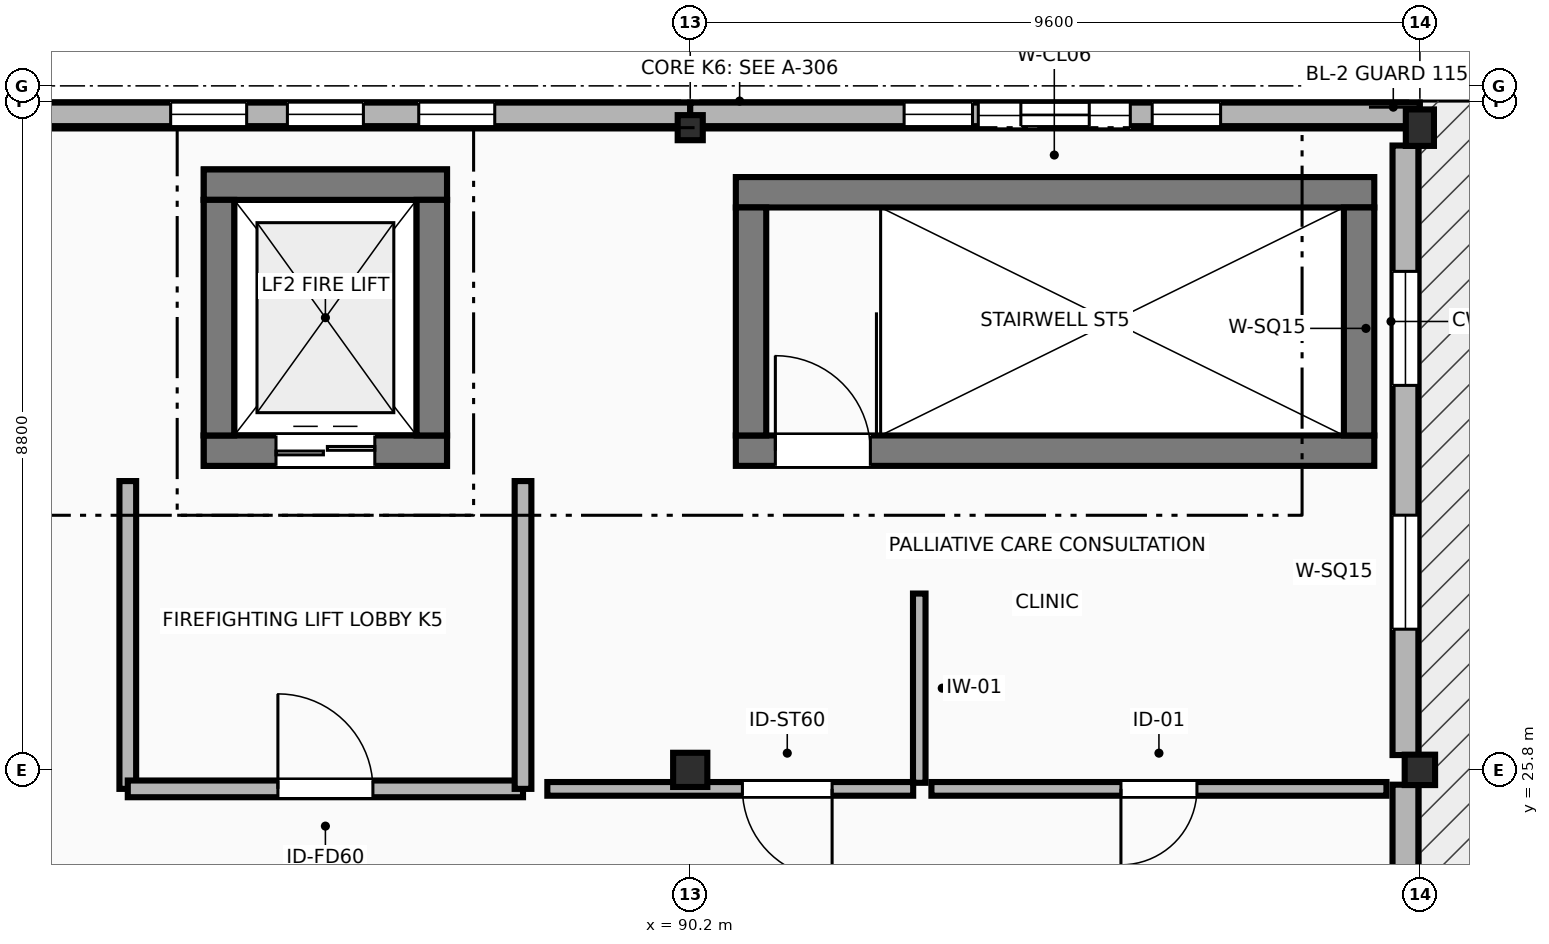
"""IFC4 building model, lengths in metres.
Left out: names, types, materials, properties, quantities, classifications, styles, units other than length and angle.
Written with IfcOpenShell. Run it as: python <this file> out.ifc"""

import sys

from ifc_helpers import new_model, si_unit, direction, frame, frame_2d, origin, origin_2d, place, context, subcontext, project, spatial, polyline, rectangle, outline, extrude, element, fill, save


model = new_model("IFC4")
c1 = context("Model", 3, precision=1e-05, world=origin(), true_north=direction((0.0, 1.0)))
c2 = subcontext(c1, "Body", "Model", "MODEL_VIEW")
j1 = project(units=[si_unit("LENGTHUNIT", "METRE"), si_unit("PLANEANGLEUNIT", "RADIAN")], contexts=[c1])
p1 = place(None, origin())
s1 = spatial("IfcSite", under=j1, at=p1, CompositionType="ELEMENT")
p2 = place(p1, origin())
s2 = spatial("IfcBuilding", under=s1, at=p2, CompositionType="ELEMENT")
p3 = place(p2, frame((0.0, 0.0, 22.2)))
s3 = spatial("IfcBuildingStorey", under=s2, at=p3, CompositionType="ELEMENT", Elevation=22.2)
p4 = place(p3, frame((90.2, 25.8, 0.0), z_axis=(0.0, 0.0, 1.0), x_axis=(1.0, 0.0, 0.0)))
e1 = element("IfcColumn", 1, at=p4, inside=s3, PredefinedType="COLUMN", context=c2, shape_type="SweptSolid", body=[
    extrude(rectangle(XDim=0.45, YDim=0.45, at=origin_2d()), origin(), (0.0, 0.0, 1.0), 4.2),
])
p5 = place(p3, frame((90.2, 34.25, 0.0), z_axis=(0.0, 0.0, 1.0), x_axis=(1.0, 0.0, 0.0)))
e2 = element("IfcColumn", 2, at=p5, inside=s3, PredefinedType="COLUMN", context=c2, shape_type="SweptSolid", body=[
    extrude(rectangle(XDim=0.33, YDim=0.33, at=origin_2d()), origin(), (0.0, 0.0, 1.0), 4.2),
])
p6 = place(p3, frame((99.8, 25.8, 0.0), z_axis=(0.0, 0.0, 1.0), x_axis=(1.0, 0.0, 0.0)))
e3 = element("IfcColumn", 3, at=p6, inside=s3, PredefinedType="COLUMN", context=c2, shape_type="SweptSolid", body=[
    extrude(rectangle(XDim=0.4, YDim=0.4, at=origin_2d()), origin(), (0.0, 0.0, 1.0), 4.2),
])
p7 = place(p3, frame((99.8, 34.25, 0.0), z_axis=(0.0, 0.0, 1.0), x_axis=(1.0, 0.0, 0.0)))
e4 = element("IfcColumn", 4, at=p7, inside=s3, PredefinedType="COLUMN", context=c2, shape_type="SweptSolid", body=[
    extrude(rectangle(XDim=0.37, YDim=0.48, at=origin_2d()), origin(), (0.0, 0.0, 1.0), 4.2),
])
p8 = place(p3, frame((99.61, 17.385, 0.0), z_axis=(0.0, 0.0, 1.0), x_axis=(0.0, 1.0, 0.0)))
e5 = element("IfcWall", 5, at=p8, inside=s3, PredefinedType="STANDARD", context=c2, shape_type="SweptSolid", body=[
    extrude(rectangle(XDim=8.22, YDim=0.34, at=frame_2d((4.11, 0.0))), origin(), (0.0, 0.0, 1.0), 3.035),
])
p9 = place(p8, frame((1.816, 0.0, 1.15)))
e6 = element("IfcOpeningElement", 6, at=p9, cuts=e5, PredefinedType="OPENING", context=c2, shape_type="SweptSolid", body=[
    extrude(rectangle(XDim=1.3, YDim=1.3, at=frame_2d((0.65, 0.65))), frame((0.0, 0.18, 0.0), z_axis=(0.0, -1.0, 0.0), x_axis=(1.0, 0.0, 0.0)), (0.0, 0.0, 1.0), 0.36),
])
p10 = place(p8, frame((5.104, 0.0, 1.15)))
e7 = element("IfcOpeningElement", 7, at=p10, cuts=e5, PredefinedType="OPENING", context=c2, shape_type="SweptSolid", body=[
    extrude(rectangle(XDim=1.3, YDim=1.3, at=frame_2d((0.65, 0.65))), frame((0.0, 0.18, 0.0), z_axis=(0.0, -1.0, 0.0), x_axis=(1.0, 0.0, 0.0)), (0.0, 0.0, 1.0), 0.36),
])
p11 = place(p3, frame((99.61, 25.995, 0.0), z_axis=(0.0, 0.0, 1.0), x_axis=(0.0, 1.0, 0.0)))
e8 = element("IfcWall", 8, at=p11, inside=s3, PredefinedType="STANDARD", context=c2, shape_type="SweptSolid", body=[
    extrude(rectangle(XDim=8.02, YDim=0.34, at=frame_2d((4.01, 0.0))), origin(), (0.0, 0.0, 1.0), 3.035),
])
p12 = place(p11, frame((1.656, 0.0, 1.15)))
e9 = element("IfcOpeningElement", 9, at=p12, cuts=e8, PredefinedType="OPENING", context=c2, shape_type="SweptSolid", body=[
    extrude(rectangle(XDim=1.5, YDim=1.5, at=frame_2d((0.75, 0.75))), frame((0.0, 0.18, 0.0), z_axis=(0.0, -1.0, 0.0), x_axis=(1.0, 0.0, 0.0)), (0.0, 0.0, 1.0), 0.36),
])
p13 = place(p11, frame((4.864, 0.0, 1.15)))
e10 = element("IfcOpeningElement", 10, at=p13, cuts=e8, PredefinedType="OPENING", context=c2, shape_type="SweptSolid", body=[
    extrude(rectangle(XDim=1.5, YDim=1.5, at=frame_2d((0.75, 0.75))), frame((0.0, 0.18, 0.0), z_axis=(0.0, -1.0, 0.0), x_axis=(1.0, 0.0, 0.0)), (0.0, 0.0, 1.0), 0.36),
])
p14 = place(p3, frame((99.62, 34.41, 0.0), z_axis=(0.0, 0.0, 1.0), x_axis=(-1.0, 0.0, 0.0)))
e11 = element("IfcWall", 11, at=p14, inside=s3, PredefinedType="STANDARD", context=c2, shape_type="SweptSolid", body=[
    extrude(rectangle(XDim=9.26, YDim=0.34, at=frame_2d((4.63, 0.0))), origin(), (0.0, 0.0, 1.0), 3.92),
])
p15 = place(p14, frame((3.63, 0.0, 0.95)))
e12 = element("IfcOpeningElement", 12, at=p15, cuts=e11, PredefinedType="OPENING", context=c2, shape_type="SweptSolid", body=[
    extrude(rectangle(XDim=2.0, YDim=1.6, at=frame_2d((1.0, 0.8))), frame((0.0, 0.18, 0.0), z_axis=(0.0, -1.0, 0.0), x_axis=(1.0, 0.0, 0.0)), (0.0, 0.0, 1.0), 0.36),
])
p16 = place(p3, frame((90.04, 34.41, 0.0), z_axis=(0.0, 0.0, 1.0), x_axis=(-1.0, 0.0, 0.0)))
e13 = element("IfcWall", 13, at=p16, inside=s3, PredefinedType="STANDARD", context=c2, shape_type="SweptSolid", body=[
    extrude(rectangle(XDim=9.255, YDim=0.34, at=frame_2d((4.627, 0.0))), origin(), (0.0, 0.0, 1.0), 3.92),
])
p17 = place(p3, frame((90.2, 34.425, 4.2), z_axis=(0.0, 0.0, 1.0), x_axis=(-1.0, 0.0, 0.0)))
e14 = element("IfcWall", 14, at=p17, inside=s3, PredefinedType="STANDARD", context=c2, shape_type="SweptSolid", body=[
    extrude(outline(polyline([(0.0, 0.0), (9.6, 0.0), (9.6, 0.0), (4.8, 7.99), (0.0, 0.0), (0.0, 0.0)])), frame((0.0, 0.155, 0.0), z_axis=(0.0, -1.0, 0.0), x_axis=(1.0, 0.0, 0.0)), (0.0, 0.0, 1.0), 0.31),
])
p18 = place(p17, frame((2.572, 0.0, 0.75)))
e15 = element("IfcOpeningElement", 15, at=p18, cuts=e14, PredefinedType="OPENING", context=c2, shape_type="SweptSolid", body=[
    extrude(rectangle(XDim=1.0, YDim=1.0, at=frame_2d((0.5, 0.5))), frame((0.0, 0.165, 0.0), z_axis=(0.0, -1.0, 0.0), x_axis=(1.0, 0.0, 0.0)), (0.0, 0.0, 1.0), 0.33),
])
p19 = place(p17, frame((5.836, 0.0, 1.55)))
e16 = element("IfcOpeningElement", 16, at=p19, cuts=e14, PredefinedType="OPENING", context=c2, shape_type="SweptSolid", body=[
    extrude(rectangle(XDim=1.0, YDim=1.0, at=frame_2d((0.5, 0.5))), frame((0.0, 0.165, 0.0), z_axis=(0.0, -1.0, 0.0), x_axis=(1.0, 0.0, 0.0)), (0.0, 0.0, 1.0), 0.33),
])
p20 = place(p17, frame((4.3, 0.0, 3.35)))
e17 = element("IfcOpeningElement", 17, at=p20, cuts=e14, PredefinedType="OPENING", context=c2, shape_type="SweptSolid", body=[
    extrude(rectangle(XDim=1.0, YDim=1.0, at=frame_2d((0.5, 0.5))), frame((0.0, 0.165, 0.0), z_axis=(0.0, -1.0, 0.0), x_axis=(1.0, 0.0, 0.0)), (0.0, 0.0, 1.0), 0.33),
])
p21 = place(p3, frame((99.8, 34.425, 4.2), z_axis=(0.0, 0.0, 1.0), x_axis=(-1.0, 0.0, 0.0)))
e18 = element("IfcWall", 18, at=p21, inside=s3, PredefinedType="STANDARD", context=c2, shape_type="SweptSolid", body=[
    extrude(outline(polyline([(0.0, 0.0), (9.6, 0.0), (9.6, 0.0), (4.8, 8.79), (0.0, 0.0), (0.0, 0.0)])), frame((0.0, 0.155, 0.0), z_axis=(0.0, -1.0, 0.0), x_axis=(1.0, 0.0, 0.0)), (0.0, 0.0, 1.0), 0.31),
])
p22 = place(p21, frame((2.622, 0.0, 0.75)))
e19 = element("IfcOpeningElement", 19, at=p22, cuts=e18, PredefinedType="OPENING", context=c2, shape_type="SweptSolid", body=[
    extrude(rectangle(XDim=0.9, YDim=0.9, at=frame_2d((0.45, 0.45))), frame((0.0, 0.165, 0.0), z_axis=(0.0, -1.0, 0.0), x_axis=(1.0, 0.0, 0.0)), (0.0, 0.0, 1.0), 0.33),
])
p23 = place(p21, frame((5.886, 0.0, 1.55)))
e20 = element("IfcOpeningElement", 20, at=p23, cuts=e18, PredefinedType="OPENING", context=c2, shape_type="SweptSolid", body=[
    extrude(rectangle(XDim=0.9, YDim=0.9, at=frame_2d((0.45, 0.45))), frame((0.0, 0.165, 0.0), z_axis=(0.0, -1.0, 0.0), x_axis=(1.0, 0.0, 0.0)), (0.0, 0.0, 1.0), 0.33),
])
p24 = place(p21, frame((4.35, 0.0, 3.35)))
e21 = element("IfcOpeningElement", 21, at=p24, cuts=e18, PredefinedType="OPENING", context=c2, shape_type="SweptSolid", body=[
    extrude(rectangle(XDim=0.9, YDim=0.9, at=frame_2d((0.45, 0.45))), frame((0.0, 0.165, 0.0), z_axis=(0.0, -1.0, 0.0), x_axis=(1.0, 0.0, 0.0)), (0.0, 0.0, 1.0), 0.33),
])
p25 = place(p3, frame((90.8, 30.0, 0.0), z_axis=(0.0, 0.0, 1.0), x_axis=(1.0, 0.0, 0.0)))
e22 = element("IfcWall", 22, at=p25, inside=s3, PredefinedType="SHEAR", context=c2, shape_type="SweptSolid", body=[
    extrude(rectangle(XDim=8.4, YDim=0.4, at=frame_2d((4.2, 0.0))), origin(), (0.0, 0.0, 1.0), 3.92),
])
p26 = place(p25, frame((0.52, 0.0, 0.0)))
e23 = element("IfcOpeningElement", 23, at=p26, cuts=e22, PredefinedType="OPENING", context=c2, shape_type="SweptSolid", body=[
    extrude(rectangle(XDim=1.25, YDim=2.2, at=frame_2d((0.625, 1.1))), frame((0.0, 0.21, 0.0), z_axis=(0.0, -1.0, 0.0), x_axis=(1.0, 0.0, 0.0)), (0.0, 0.0, 1.0), 0.42),
])
p27 = place(p3, frame((99.2, 33.4, 0.0), z_axis=(0.0, 0.0, 1.0), x_axis=(-1.0, 0.0, 0.0)))
e24 = element("IfcWall", 24, at=p27, inside=s3, PredefinedType="SHEAR", context=c2, shape_type="SweptSolid", body=[
    extrude(rectangle(XDim=8.4, YDim=0.4, at=frame_2d((4.2, 0.0))), origin(), (0.0, 0.0, 1.0), 3.92),
])
for number, where, z_axis, x_axis in (
    (25, (91.0, 30.2, 0.0), (0.0, 0.0, 1.0), (0.0, 1.0, 0.0)),
    (26, (99.0, 33.2, 0.0), (0.0, 0.0, 1.0), (0.0, -1.0, 0.0)),
):
    element("IfcWall", number, at=place(p3, frame(where, z_axis=z_axis, x_axis=x_axis)), inside=s3, PredefinedType="SHEAR", context=c2, shape_type="SweptSolid", body=[
        extrude(rectangle(XDim=3.0, YDim=0.4, at=frame_2d((1.5, 0.0))), origin(), (0.0, 0.0, 1.0), 3.92),
    ])
p28 = place(p3, frame((83.8, 30.0, 0.0), z_axis=(0.0, 0.0, 1.0), x_axis=(1.0, 0.0, 0.0)))
e27 = element("IfcWall", 27, at=p28, inside=s3, PredefinedType="SHEAR", context=c2, shape_type="SweptSolid", body=[
    extrude(rectangle(XDim=3.2, YDim=0.4, at=frame_2d((1.6, 0.0))), origin(), (0.0, 0.0, 1.0), 4.2),
])
p29 = place(p28, frame((0.95, 0.0, 0.0)))
e28 = element("IfcOpeningElement", 28, at=p29, cuts=e27, PredefinedType="OPENING", context=c2, shape_type="SweptSolid", body=[
    extrude(rectangle(XDim=1.3, YDim=2.25, at=frame_2d((0.65, 1.125))), frame((0.0, 0.21, 0.0), z_axis=(0.0, -1.0, 0.0), x_axis=(1.0, 0.0, 0.0)), (0.0, 0.0, 1.0), 0.42),
])
p30 = place(p3, frame((87.0, 33.5, 0.0), z_axis=(0.0, 0.0, 1.0), x_axis=(-1.0, 0.0, 0.0)))
e29 = element("IfcWall", 29, at=p30, inside=s3, PredefinedType="SHEAR", context=c2, shape_type="SweptSolid", body=[
    extrude(rectangle(XDim=3.2, YDim=0.4, at=frame_2d((1.6, 0.0))), origin(), (0.0, 0.0, 1.0), 4.2),
])
for number, where, z_axis, x_axis in (
    (30, (84.0, 30.2, 0.0), (0.0, 0.0, 1.0), (0.0, 1.0, 0.0)),
    (31, (86.8, 33.3, 0.0), (0.0, 0.0, 1.0), (0.0, -1.0, 0.0)),
):
    element("IfcWall", number, at=place(p3, frame(where, z_axis=z_axis, x_axis=x_axis)), inside=s3, PredefinedType="SHEAR", context=c2, shape_type="SweptSolid", body=[
        extrude(rectangle(XDim=3.1, YDim=0.4, at=frame_2d((1.55, 0.0))), origin(), (0.0, 0.0, 1.0), 4.2),
    ])
for number, where, z_axis, x_axis in (
    (32, (83.8, 30.0, 4.2), (0.0, 0.0, 1.0), (1.0, 0.0, 0.0)),
    (33, (87.0, 33.5, 4.2), (0.0, 0.0, 1.0), (-1.0, 0.0, 0.0)),
):
    element("IfcWall", number, at=place(p3, frame(where, z_axis=z_axis, x_axis=x_axis)), inside=s3, PredefinedType="SHEAR", context=c2, shape_type="SweptSolid", body=[
        extrude(rectangle(XDim=3.2, YDim=0.4, at=frame_2d((1.6, 0.0))), origin(), (0.0, 0.0, 1.0), 3.15),
    ])
for number, where, z_axis, x_axis in (
    (34, (84.0, 30.2, 4.2), (0.0, 0.0, 1.0), (0.0, 1.0, 0.0)),
    (35, (86.8, 33.3, 4.2), (0.0, 0.0, 1.0), (0.0, -1.0, 0.0)),
):
    element("IfcWall", number, at=place(p3, frame(where, z_axis=z_axis, x_axis=x_axis)), inside=s3, PredefinedType="SHEAR", context=c2, shape_type="SweptSolid", body=[
        extrude(rectangle(XDim=3.1, YDim=0.4, at=frame_2d((1.55, 0.0))), origin(), (0.0, 0.0, 1.0), 3.15),
    ])
p31 = place(p3, frame((82.8, 29.6, 0.0), z_axis=(0.0, 0.0, 1.0), x_axis=(0.0, -1.0, 0.0)))
e36 = element("IfcWall", 36, at=p31, inside=s3, PredefinedType="PARTITIONING", context=c2, shape_type="SweptSolid", body=[
    extrude(rectangle(XDim=4.05, YDim=0.22, at=frame_2d((2.025, 0.0))), origin(), (0.0, 0.0, 1.0), 3.92),
])
p32 = place(p3, frame((82.8, 25.55, 0.0), z_axis=(0.0, 0.0, 1.0), x_axis=(1.0, 0.0, 0.0)))
e37 = element("IfcWall", 37, at=p32, inside=s3, PredefinedType="PARTITIONING", context=c2, shape_type="SweptSolid", body=[
    extrude(rectangle(XDim=5.2, YDim=0.22, at=frame_2d((2.6, 0.0))), origin(), (0.0, 0.0, 1.0), 3.92),
])
p33 = place(p32, frame((1.975, 0.0, 0.0)))
e38 = element("IfcOpeningElement", 38, at=p33, cuts=e37, PredefinedType="OPENING", context=c2, shape_type="SweptSolid", body=[
    extrude(rectangle(XDim=1.25, YDim=2.2, at=frame_2d((0.625, 1.1))), frame((0.0, 0.12, 0.0), z_axis=(0.0, -1.0, 0.0), x_axis=(1.0, 0.0, 0.0)), (0.0, 0.0, 1.0), 0.24),
])
p34 = place(p3, frame((88.0, 25.55, 0.0), z_axis=(0.0, 0.0, 1.0), x_axis=(0.0, 1.0, 0.0)))
e39 = element("IfcWall", 39, at=p34, inside=s3, PredefinedType="PARTITIONING", context=c2, shape_type="SweptSolid", body=[
    extrude(rectangle(XDim=4.05, YDim=0.22, at=frame_2d((2.025, 0.0))), origin(), (0.0, 0.0, 1.0), 3.92),
])
p35 = place(p3, frame((93.213, 28.12, 0.0), z_axis=(0.0, 0.0, 1.0), x_axis=(0.0, -1.0, 0.0)))
e40 = element("IfcWall", 40, at=p35, inside=s3, PredefinedType="PARTITIONING", context=c2, shape_type="SweptSolid", body=[
    extrude(rectangle(XDim=2.49, YDim=0.165, at=frame_2d((1.245, 0.0))), origin(), (0.0, 0.0, 1.0), 3.92),
])
p36 = place(p3, frame((93.133, 25.55, 0.0), z_axis=(0.0, 0.0, 1.0), x_axis=(-1.0, 0.0, 0.0)))
e41 = element("IfcWall", 41, at=p36, inside=s3, PredefinedType="PARTITIONING", context=c2, shape_type="SweptSolid", body=[
    extrude(rectangle(XDim=4.813, YDim=0.18, at=frame_2d((2.407, 0.0))), origin(), (0.0, 0.0, 1.0), 3.92),
])
p37 = place(p36, frame((1.067, 0.0, 0.0)))
e42 = element("IfcOpeningElement", 42, at=p37, cuts=e41, PredefinedType="OPENING", context=c2, shape_type="SweptSolid", body=[
    extrude(rectangle(XDim=1.18, YDim=2.18, at=frame_2d((0.59, 1.09))), frame((0.0, 0.1, 0.0), z_axis=(0.0, -1.0, 0.0), x_axis=(1.0, 0.0, 0.0)), (0.0, 0.0, 1.0), 0.2),
])
p38 = place(p3, frame((99.36, 25.55, 0.0), z_axis=(0.0, 0.0, 1.0), x_axis=(-1.0, 0.0, 0.0)))
e43 = element("IfcWall", 43, at=p38, inside=s3, PredefinedType="PARTITIONING", context=c2, shape_type="SweptSolid", body=[
    extrude(rectangle(XDim=5.987, YDim=0.18, at=frame_2d((2.993, 0.0))), origin(), (0.0, 0.0, 1.0), 3.92),
])
p39 = place(p38, frame((2.493, 0.0, 0.0)))
e44 = element("IfcOpeningElement", 44, at=p39, cuts=e43, PredefinedType="OPENING", context=c2, shape_type="SweptSolid", body=[
    extrude(rectangle(XDim=1.0, YDim=2.15, at=frame_2d((0.5, 1.075))), frame((0.0, 0.1, 0.0), z_axis=(0.0, -1.0, 0.0), x_axis=(1.0, 0.0, 0.0)), (0.0, 0.0, 1.0), 0.2),
])
p40 = place(p12, origin())
e45 = element("IfcWindow", 45, at=p40, inside=s3, PartitioningType="SINGLE_PANEL", PredefinedType="WINDOW", context=c2, shape_type="SweptSolid", body=[
    extrude(rectangle(XDim=1.5, YDim=1.5, at=frame_2d((0.75, 0.75))), frame((0.0, 0.03, 0.0), z_axis=(0.0, -1.0, 0.0), x_axis=(1.0, 0.0, 0.0)), (0.0, 0.0, 1.0), 0.06),
])
fill(e9, e45)
p41 = place(p13, origin())
e46 = element("IfcWindow", 46, at=p41, inside=s3, PartitioningType="SINGLE_PANEL", PredefinedType="WINDOW", context=c2, shape_type="SweptSolid", body=[
    extrude(rectangle(XDim=1.5, YDim=1.5, at=frame_2d((0.75, 0.75))), frame((0.0, 0.03, 0.0), z_axis=(0.0, -1.0, 0.0), x_axis=(1.0, 0.0, 0.0)), (0.0, 0.0, 1.0), 0.06),
])
fill(e10, e46)
p42 = place(p15, origin())
e47 = element("IfcWindow", 47, at=p42, inside=s3, PartitioningType="SINGLE_PANEL", PredefinedType="WINDOW", context=c2, shape_type="SweptSolid", body=[
    extrude(rectangle(XDim=2.0, YDim=1.6, at=frame_2d((1.0, 0.8))), frame((0.0, 0.03, 0.0), z_axis=(0.0, -1.0, 0.0), x_axis=(1.0, 0.0, 0.0)), (0.0, 0.0, 1.0), 0.06),
])
fill(e12, e47)
p43 = place(p18, origin())
e48 = element("IfcWindow", 48, at=p43, inside=s3, PartitioningType="SINGLE_PANEL", PredefinedType="WINDOW", context=c2, shape_type="SweptSolid", body=[
    extrude(rectangle(XDim=1.0, YDim=1.0, at=frame_2d((0.5, 0.5))), frame((0.0, 0.03, 0.0), z_axis=(0.0, -1.0, 0.0), x_axis=(1.0, 0.0, 0.0)), (0.0, 0.0, 1.0), 0.06),
])
fill(e15, e48)
p44 = place(p19, origin())
e49 = element("IfcWindow", 49, at=p44, inside=s3, PartitioningType="SINGLE_PANEL", PredefinedType="WINDOW", context=c2, shape_type="SweptSolid", body=[
    extrude(rectangle(XDim=1.0, YDim=1.0, at=frame_2d((0.5, 0.5))), frame((0.0, 0.03, 0.0), z_axis=(0.0, -1.0, 0.0), x_axis=(1.0, 0.0, 0.0)), (0.0, 0.0, 1.0), 0.06),
])
fill(e16, e49)
p45 = place(p20, origin())
e50 = element("IfcWindow", 50, at=p45, inside=s3, PartitioningType="SINGLE_PANEL", PredefinedType="WINDOW", context=c2, shape_type="SweptSolid", body=[
    extrude(rectangle(XDim=1.0, YDim=1.0, at=frame_2d((0.5, 0.5))), frame((0.0, 0.03, 0.0), z_axis=(0.0, -1.0, 0.0), x_axis=(1.0, 0.0, 0.0)), (0.0, 0.0, 1.0), 0.06),
])
fill(e17, e50)
p46 = place(p22, origin())
e51 = element("IfcWindow", 51, at=p46, inside=s3, PartitioningType="SINGLE_PANEL", PredefinedType="WINDOW", context=c2, shape_type="SweptSolid", body=[
    extrude(rectangle(XDim=0.9, YDim=0.9, at=frame_2d((0.45, 0.45))), frame((0.0, 0.03, 0.0), z_axis=(0.0, -1.0, 0.0), x_axis=(1.0, 0.0, 0.0)), (0.0, 0.0, 1.0), 0.06),
])
fill(e19, e51)
p47 = place(p23, origin())
e52 = element("IfcWindow", 52, at=p47, inside=s3, PartitioningType="SINGLE_PANEL", PredefinedType="WINDOW", context=c2, shape_type="SweptSolid", body=[
    extrude(rectangle(XDim=0.9, YDim=0.9, at=frame_2d((0.45, 0.45))), frame((0.0, 0.03, 0.0), z_axis=(0.0, -1.0, 0.0), x_axis=(1.0, 0.0, 0.0)), (0.0, 0.0, 1.0), 0.06),
])
fill(e20, e52)
p48 = place(p24, origin())
e53 = element("IfcWindow", 53, at=p48, inside=s3, PartitioningType="SINGLE_PANEL", PredefinedType="WINDOW", context=c2, shape_type="SweptSolid", body=[
    extrude(rectangle(XDim=0.9, YDim=0.9, at=frame_2d((0.45, 0.45))), frame((0.0, 0.03, 0.0), z_axis=(0.0, -1.0, 0.0), x_axis=(1.0, 0.0, 0.0)), (0.0, 0.0, 1.0), 0.06),
])
fill(e21, e53)
p49 = place(p26, origin())
e54 = element("IfcDoor", 54, at=p49, inside=s3, OperationType="SINGLE_SWING_LEFT", PredefinedType="DOOR", context=c2, shape_type="SweptSolid", body=[
    extrude(rectangle(XDim=1.25, YDim=2.2, at=frame_2d((0.625, 1.1))), frame((0.0, 0.025, 0.0), z_axis=(0.0, -1.0, 0.0), x_axis=(1.0, 0.0, 0.0)), (0.0, 0.0, 1.0), 0.05),
])
fill(e23, e54)
p50 = place(p29, origin())
e55 = element("IfcDoor", 55, at=p50, inside=s3, OperationType="DOUBLE_DOOR_SLIDING", PredefinedType="DOOR", context=c2, shape_type="SweptSolid", body=[
    extrude(rectangle(XDim=1.3, YDim=2.25, at=frame_2d((0.65, 1.125))), frame((0.0, 0.025, 0.0), z_axis=(0.0, -1.0, 0.0), x_axis=(1.0, 0.0, 0.0)), (0.0, 0.0, 1.0), 0.05),
])
fill(e28, e55)
p51 = place(p33, origin())
e56 = element("IfcDoor", 56, at=p51, inside=s3, OperationType="SINGLE_SWING_LEFT", PredefinedType="DOOR", context=c2, shape_type="SweptSolid", body=[
    extrude(rectangle(XDim=1.25, YDim=2.2, at=frame_2d((0.625, 1.1))), frame((0.0, 0.025, 0.0), z_axis=(0.0, -1.0, 0.0), x_axis=(1.0, 0.0, 0.0)), (0.0, 0.0, 1.0), 0.05),
])
fill(e38, e56)
p52 = place(p37, origin())
e57 = element("IfcDoor", 57, at=p52, inside=s3, OperationType="SINGLE_SWING_LEFT", PredefinedType="DOOR", context=c2, shape_type="SweptSolid", body=[
    extrude(rectangle(XDim=1.18, YDim=2.18, at=frame_2d((0.59, 1.09))), frame((0.0, 0.025, 0.0), z_axis=(0.0, -1.0, 0.0), x_axis=(1.0, 0.0, 0.0)), (0.0, 0.0, 1.0), 0.05),
])
fill(e42, e57)
p53 = place(p39, origin())
e58 = element("IfcDoor", 58, at=p53, inside=s3, OperationType="SINGLE_SWING_RIGHT", PredefinedType="DOOR", context=c2, shape_type="SweptSolid", body=[
    extrude(rectangle(XDim=1.0, YDim=2.15, at=frame_2d((0.5, 1.075))), frame((0.0, 0.025, 0.0), z_axis=(0.0, -1.0, 0.0), x_axis=(1.0, 0.0, 0.0)), (0.0, 0.0, 1.0), 0.05),
])
fill(e44, e58)
save(model, sys.argv[1])
